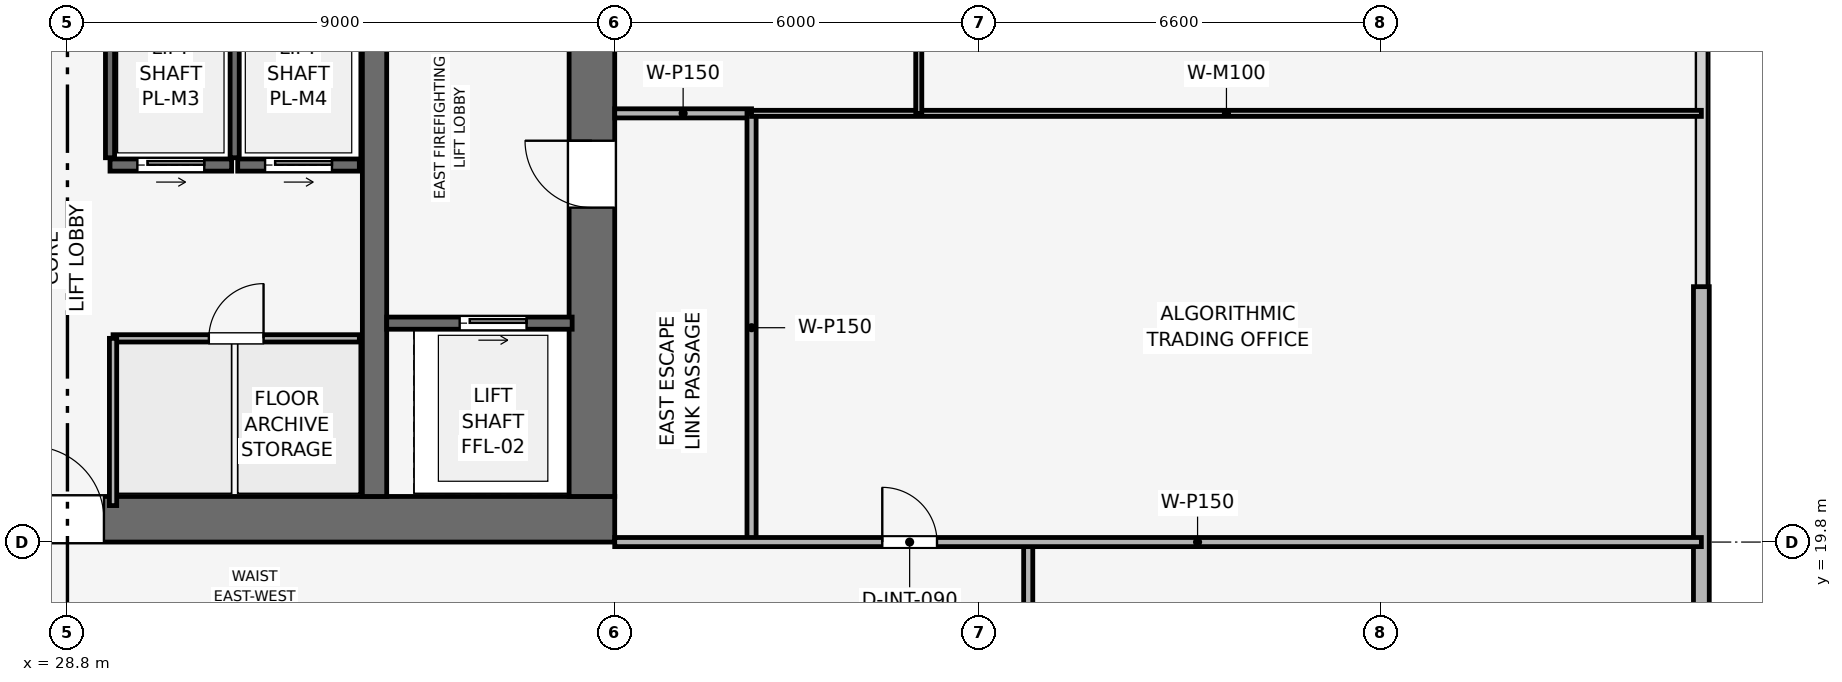
"""IFC4 building model, lengths in metres.
Left out: names, types, materials, properties, quantities, classifications, styles, units other than length and angle.
Written with IfcOpenShell. Run it as: python <this file> out.ifc"""

import sys

from ifc_helpers import new_model, si_unit, direction, frame, frame_2d, origin, place, context, subcontext, project, spatial, rectangle, extrude, element, fill, save


model = new_model("IFC4")
c1 = context("Model", 3, precision=1e-05, world=origin(), true_north=direction((0.0, 1.0)))
c2 = subcontext(c1, "Body", "Model", "MODEL_VIEW")
j1 = project(units=[si_unit("LENGTHUNIT", "METRE"), si_unit("PLANEANGLEUNIT", "RADIAN")], contexts=[c1])
p1 = place(None, origin())
s1 = spatial("IfcSite", under=j1, at=p1, CompositionType="ELEMENT")
p2 = place(p1, origin())
s2 = spatial("IfcBuilding", under=s1, at=p2, CompositionType="ELEMENT")
p3 = place(p2, frame((0.0, 0.0, 241.2)))
s3 = spatial("IfcBuildingStorey", under=s2, at=p3, CompositionType="ELEMENT", Elevation=241.2)
p4 = place(p3, frame((19.8, 20.175, 0.0), z_axis=(0.0, 0.0, 1.0), x_axis=(1.0, 0.0, 0.0)))
e1 = element("IfcWall", 1, at=p4, inside=s3, PredefinedType="SHEAR", context=c2, shape_type="SweptSolid", body=[
    extrude(rectangle(XDim=18.0, YDim=0.75, at=frame_2d((9.0, 0.0))), origin(), (0.0, 0.0, 1.0), 5.4),
])
p5 = place(p4, frame((8.4, 0.0, 0.0)))
e2 = element("IfcOpeningElement", 2, at=p5, cuts=e1, PredefinedType="OPENING", context=c2, shape_type="SweptSolid", body=[
    extrude(rectangle(XDim=1.2, YDim=2.2, at=frame_2d((0.6, 1.1))), frame((0.0, 0.385, 0.0), z_axis=(0.0, -1.0, 0.0), x_axis=(1.0, 0.0, 0.0)), (0.0, 0.0, 1.0), 0.77),
])
p6 = place(p3, frame((37.425, 20.55, 0.0), z_axis=(0.0, 0.0, 1.0), x_axis=(0.0, 1.0, 0.0)))
e3 = element("IfcWall", 3, at=p6, inside=s3, PredefinedType="SHEAR", context=c2, shape_type="SweptSolid", body=[
    extrude(rectangle(XDim=16.5, YDim=0.75, at=frame_2d((8.25, 0.0))), origin(), (0.0, 0.0, 1.0), 5.4),
])
p7 = place(p6, frame((4.75, 0.0, 0.0)))
e4 = element("IfcOpeningElement", 4, at=p7, cuts=e3, PredefinedType="OPENING", context=c2, shape_type="SweptSolid", body=[
    extrude(rectangle(XDim=1.1, YDim=2.15, at=frame_2d((0.55, 1.075))), frame((0.0, 0.385, 0.0), z_axis=(0.0, -1.0, 0.0), x_axis=(1.0, 0.0, 0.0)), (0.0, 0.0, 1.0), 0.77),
])
p8 = place(p3, frame((33.85, 20.55, 0.0), z_axis=(0.0, 0.0, 1.0), x_axis=(0.0, 1.0, 0.0)))
e5 = element("IfcWall", 5, at=p8, inside=s3, PredefinedType="SHEAR", context=c2, shape_type="SweptSolid", body=[
    extrude(rectangle(XDim=16.5, YDim=0.4, at=frame_2d((8.25, 0.0))), origin(), (0.0, 0.0, 1.0), 5.4),
])
p9 = place(p3, frame((55.67, 24.0, 0.0), z_axis=(0.0, 0.0, 1.0), x_axis=(0.0, -1.0, 0.0)))
e6 = element("IfcWall", 6, at=p9, inside=s3, PredefinedType="SOLIDWALL", context=c2, shape_type="SweptSolid", body=[
    extrude(rectangle(XDim=14.7, YDim=0.26, at=frame_2d((7.35, 0.0))), origin(), (0.0, 0.0, 1.0), 5.15),
])
p10 = place(p9, frame((11.85, 0.0, 0.9)))
e7 = element("IfcOpeningElement", 7, at=p10, cuts=e6, PredefinedType="OPENING", context=c2, shape_type="SweptSolid", body=[
    extrude(rectangle(XDim=2.6, YDim=2.2, at=frame_2d((1.3, 1.1))), frame((0.0, 0.14, 0.0), z_axis=(0.0, -1.0, 0.0), x_axis=(1.0, 0.0, 0.0)), (0.0, 0.0, 1.0), 0.28),
])
p11 = place(p3, frame((34.05, 23.4, 0.0), z_axis=(0.0, 0.0, 1.0), x_axis=(1.0, 0.0, 0.0)))
e8 = element("IfcWall", 8, at=p11, inside=s3, PredefinedType="SHEAR", context=c2, shape_type="SweptSolid", body=[
    extrude(rectangle(XDim=3.05, YDim=0.2, at=frame_2d((1.525, 0.0))), origin(), (0.0, 0.0, 1.0), 5.15),
])
p12 = place(p11, frame((1.2, 0.0, 0.0)))
e9 = element("IfcOpeningElement", 9, at=p12, cuts=e8, PredefinedType="OPENING", context=c2, shape_type="SweptSolid", body=[
    extrude(rectangle(XDim=1.1, YDim=2.15, at=frame_2d((0.55, 1.075))), frame((0.0, 0.11, 0.0), z_axis=(0.0, -1.0, 0.0), x_axis=(1.0, 0.0, 0.0)), (0.0, 0.0, 1.0), 0.22),
])
p13 = place(p3, frame((29.5, 26.0, 0.0), z_axis=(0.0, 0.0, 1.0), x_axis=(1.0, 0.0, 0.0)))
e10 = element("IfcWall", 10, at=p13, inside=s3, PredefinedType="SHEAR", context=c2, shape_type="SweptSolid", body=[
    extrude(rectangle(XDim=2.0, YDim=0.2, at=frame_2d((1.0, 0.0))), origin(), (0.0, 0.0, 1.0), 5.15),
])
p14 = place(p13, frame((0.45, 0.0, 0.0)))
e11 = element("IfcOpeningElement", 11, at=p14, cuts=e10, PredefinedType="OPENING", context=c2, shape_type="SweptSolid", body=[
    extrude(rectangle(XDim=1.1, YDim=2.15, at=frame_2d((0.55, 1.075))), frame((0.0, 0.11, 0.0), z_axis=(0.0, -1.0, 0.0), x_axis=(1.0, 0.0, 0.0)), (0.0, 0.0, 1.0), 0.22),
])
p15 = place(p3, frame((31.6, 26.0, 0.0), z_axis=(0.0, 0.0, 1.0), x_axis=(1.0, 0.0, 0.0)))
e12 = element("IfcWall", 12, at=p15, inside=s3, PredefinedType="SHEAR", context=c2, shape_type="SweptSolid", body=[
    extrude(rectangle(XDim=2.0, YDim=0.2, at=frame_2d((1.0, 0.0))), origin(), (0.0, 0.0, 1.0), 5.15),
])
p16 = place(p15, frame((0.45, 0.0, 0.0)))
e13 = element("IfcOpeningElement", 13, at=p16, cuts=e12, PredefinedType="OPENING", context=c2, shape_type="SweptSolid", body=[
    extrude(rectangle(XDim=1.1, YDim=2.15, at=frame_2d((0.55, 1.075))), frame((0.0, 0.11, 0.0), z_axis=(0.0, -1.0, 0.0), x_axis=(1.0, 0.0, 0.0)), (0.0, 0.0, 1.0), 0.22),
])
for number, where, z_axis, x_axis in (
    (14, (29.5, 26.12, 0.0), (0.0, 0.0, 1.0), (0.0, 1.0, 0.0)),
    (15, (31.55, 26.12, 0.0), (0.0, 0.0, 1.0), (0.0, 1.0, 0.0)),
):
    element("IfcWall", number, at=place(p3, frame(where, z_axis=z_axis, x_axis=x_axis)), inside=s3, PredefinedType="SHEAR", context=c2, shape_type="SweptSolid", body=[
        extrude(rectangle(XDim=2.28, YDim=0.15, at=frame_2d((1.14, 0.0))), origin(), (0.0, 0.0, 1.0), 5.15),
    ])
p17 = place(p3, frame((29.55, 23.15, 0.0), z_axis=(0.0, 0.0, 1.0), x_axis=(1.0, 0.0, 0.0)))
e16 = element("IfcWall", 16, at=p17, inside=s3, PredefinedType="PARTITIONING", context=c2, shape_type="SweptSolid", body=[
    extrude(rectangle(XDim=4.05, YDim=0.12, at=frame_2d((2.025, 0.0))), origin(), (0.0, 0.0, 1.0), 5.15),
])
p18 = place(p17, frame((1.575, 0.0, 0.0)))
e17 = element("IfcOpeningElement", 17, at=p18, cuts=e16, PredefinedType="OPENING", context=c2, shape_type="SweptSolid", body=[
    extrude(rectangle(XDim=0.9, YDim=2.1, at=frame_2d((0.45, 1.05))), frame((0.0, 0.07, 0.0), z_axis=(0.0, -1.0, 0.0), x_axis=(1.0, 0.0, 0.0)), (0.0, 0.0, 1.0), 0.14),
])
p19 = place(p3, frame((29.55, 20.4, 0.0), z_axis=(0.0, 0.0, 1.0), x_axis=(0.0, 1.0, 0.0)))
e18 = element("IfcWall", 18, at=p19, inside=s3, PredefinedType="PARTITIONING", context=c2, shape_type="SweptSolid", body=[
    extrude(rectangle(XDim=2.75, YDim=0.12, at=frame_2d((1.375, 0.0))), origin(), (0.0, 0.0, 1.0), 5.15),
])
p20 = place(p3, frame((37.8, 26.85, 0.0), z_axis=(0.0, 0.0, 1.0), x_axis=(1.0, 0.0, 0.0)))
e19 = element("IfcWall", 19, at=p20, inside=s3, PredefinedType="PARTITIONING", context=c2, shape_type="SweptSolid", body=[
    extrude(rectangle(XDim=2.25, YDim=0.15, at=frame_2d((1.125, 0.0))), origin(), (0.0, 0.0, 1.0), 5.15),
])
p21 = place(p3, frame((40.05, 19.8, 0.0), z_axis=(0.0, 0.0, 1.0), x_axis=(0.0, 1.0, 0.0)))
e20 = element("IfcWall", 20, at=p21, inside=s3, PredefinedType="PARTITIONING", context=c2, shape_type="SweptSolid", body=[
    extrude(rectangle(XDim=7.05, YDim=0.15, at=frame_2d((3.525, 0.0))), origin(), (0.0, 0.0, 1.0), 4.735),
])
p22 = place(p3, frame((40.05, 26.85, 0.0), z_axis=(0.0, 0.0, 1.0), x_axis=(1.0, 0.0, 0.0)))
e21 = element("IfcWall", 21, at=p22, inside=s3, PredefinedType="MOVABLE", context=c2, shape_type="SweptSolid", body=[
    extrude(rectangle(XDim=15.62, YDim=0.1, at=frame_2d((7.81, 0.0))), origin(), (0.0, 0.0, 1.0), 4.735),
])
p23 = place(p3, frame((42.8, 26.85, 0.0), z_axis=(0.0, 0.0, 1.0), x_axis=(0.0, 1.0, 0.0)))
e22 = element("IfcWall", 22, at=p23, inside=s3, PredefinedType="MOVABLE", context=c2, shape_type="SweptSolid", body=[
    extrude(rectangle(XDim=10.95, YDim=0.1, at=frame_2d((5.475, 0.0))), origin(), (0.0, 0.0, 1.0), 4.735),
])
p24 = place(p23, frame((5.025, 0.0, 0.0)))
e23 = element("IfcOpeningElement", 23, at=p24, cuts=e22, PredefinedType="OPENING", context=c2, shape_type="SweptSolid", body=[
    extrude(rectangle(XDim=0.9, YDim=2.1, at=frame_2d((0.45, 1.05))), frame((0.0, 0.06, 0.0), z_axis=(0.0, -1.0, 0.0), x_axis=(1.0, 0.0, 0.0)), (0.0, 0.0, 1.0), 0.12),
])
p25 = place(p3, frame((44.6, 17.4, 0.0), z_axis=(0.0, 0.0, 1.0), x_axis=(0.0, 1.0, 0.0)))
e24 = element("IfcWall", 24, at=p25, inside=s3, PredefinedType="PARTITIONING", context=c2, shape_type="SweptSolid", body=[
    extrude(rectangle(XDim=2.4, YDim=0.15, at=frame_2d((1.2, 0.0))), origin(), (0.0, 0.0, 1.0), 5.15),
])
p26 = place(p3, frame((37.8, 19.8, 0.0), z_axis=(0.0, 0.0, 1.0), x_axis=(1.0, 0.0, 0.0)))
e25 = element("IfcWall", 25, at=p26, inside=s3, PredefinedType="PARTITIONING", context=c2, shape_type="SweptSolid", body=[
    extrude(rectangle(XDim=17.87, YDim=0.15, at=frame_2d((8.935, 0.0))), origin(), (0.0, 0.0, 1.0), 4.735),
])
p27 = place(p26, frame((4.4, 0.0, 0.0)))
e26 = element("IfcOpeningElement", 26, at=p27, cuts=e25, PredefinedType="OPENING", context=c2, shape_type="SweptSolid", body=[
    extrude(rectangle(XDim=0.9, YDim=2.1, at=frame_2d((0.45, 1.05))), frame((0.0, 0.085, 0.0), z_axis=(0.0, -1.0, 0.0), x_axis=(1.0, 0.0, 0.0)), (0.0, 0.0, 1.0), 0.17),
])
p28 = place(p12, origin())
e27 = element("IfcDoor", 27, at=p28, inside=s3, OperationType="SLIDING_TO_RIGHT", PredefinedType="DOOR", context=c2, shape_type="SweptSolid", body=[
    extrude(rectangle(XDim=1.1, YDim=2.15, at=frame_2d((0.55, 1.075))), frame((0.0, 0.025, 0.0), z_axis=(0.0, -1.0, 0.0), x_axis=(1.0, 0.0, 0.0)), (0.0, 0.0, 1.0), 0.05),
])
fill(e9, e27)
p29 = place(p14, origin())
e28 = element("IfcDoor", 28, at=p29, inside=s3, OperationType="SLIDING_TO_RIGHT", PredefinedType="DOOR", context=c2, shape_type="SweptSolid", body=[
    extrude(rectangle(XDim=1.1, YDim=2.15, at=frame_2d((0.55, 1.075))), frame((0.0, 0.025, 0.0), z_axis=(0.0, -1.0, 0.0), x_axis=(1.0, 0.0, 0.0)), (0.0, 0.0, 1.0), 0.05),
])
fill(e11, e28)
p30 = place(p16, origin())
e29 = element("IfcDoor", 29, at=p30, inside=s3, OperationType="SLIDING_TO_RIGHT", PredefinedType="DOOR", context=c2, shape_type="SweptSolid", body=[
    extrude(rectangle(XDim=1.1, YDim=2.15, at=frame_2d((0.55, 1.075))), frame((0.0, 0.025, 0.0), z_axis=(0.0, -1.0, 0.0), x_axis=(1.0, 0.0, 0.0)), (0.0, 0.0, 1.0), 0.05),
])
fill(e13, e29)
p31 = place(p18, origin())
e30 = element("IfcDoor", 30, at=p31, inside=s3, OperationType="SINGLE_SWING_RIGHT", PredefinedType="DOOR", context=c2, shape_type="SweptSolid", body=[
    extrude(rectangle(XDim=0.9, YDim=2.1, at=frame_2d((0.45, 1.05))), frame((0.0, 0.025, 0.0), z_axis=(0.0, -1.0, 0.0), x_axis=(1.0, 0.0, 0.0)), (0.0, 0.0, 1.0), 0.05),
])
fill(e17, e30)
p32 = place(p27, origin())
e31 = element("IfcDoor", 31, at=p32, inside=s3, OperationType="SINGLE_SWING_LEFT", PredefinedType="DOOR", context=c2, shape_type="SweptSolid", body=[
    extrude(rectangle(XDim=0.9, YDim=2.1, at=frame_2d((0.45, 1.05))), frame((0.0, 0.025, 0.0), z_axis=(0.0, -1.0, 0.0), x_axis=(1.0, 0.0, 0.0)), (0.0, 0.0, 1.0), 0.05),
])
fill(e26, e31)
p33 = place(p7, origin())
e32 = element("IfcDoor", 32, at=p33, inside=s3, OperationType="SINGLE_SWING_RIGHT", PredefinedType="DOOR", context=c2, shape_type="SweptSolid", body=[
    extrude(rectangle(XDim=1.1, YDim=2.15, at=frame_2d((0.55, 1.075))), frame((0.0, 0.025, 0.0), z_axis=(0.0, -1.0, 0.0), x_axis=(1.0, 0.0, 0.0)), (0.0, 0.0, 1.0), 0.05),
])
fill(e4, e32)
p34 = place(p5, origin())
e33 = element("IfcDoor", 33, at=p34, inside=s3, OperationType="SINGLE_SWING_LEFT", PredefinedType="DOOR", context=c2, shape_type="SweptSolid", body=[
    extrude(rectangle(XDim=1.2, YDim=2.2, at=frame_2d((0.6, 1.1))), frame((0.0, 0.025, 0.0), z_axis=(0.0, -1.0, 0.0), x_axis=(1.0, 0.0, 0.0)), (0.0, 0.0, 1.0), 0.05),
])
fill(e2, e33)
save(model, sys.argv[1])
